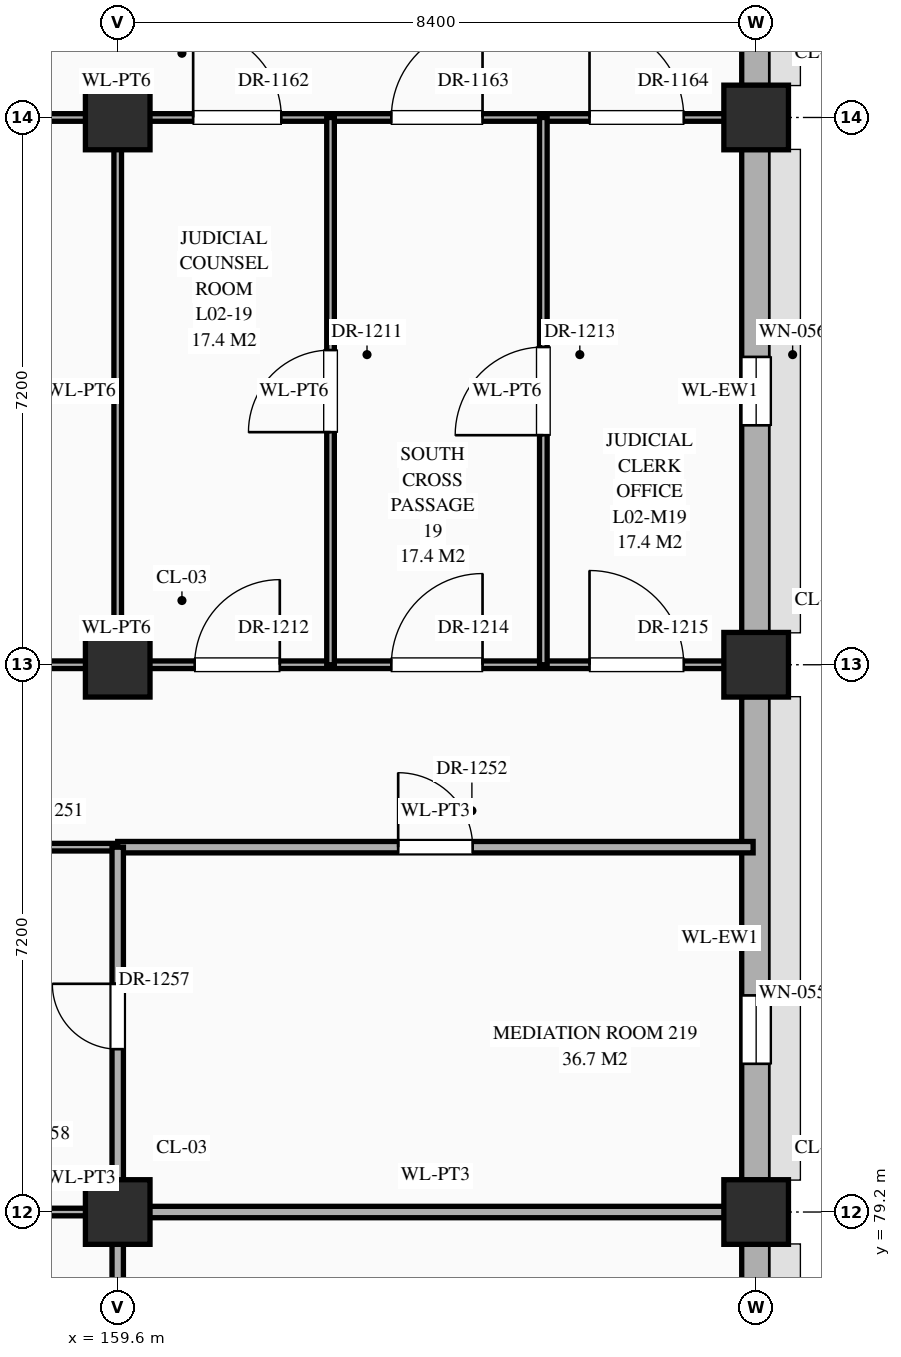
"""IFC4 building model, lengths in metres.
Left out: names, types, materials, properties, quantities, classifications, styles, units other than length and angle.
Written with IfcOpenShell. Run it as: python <this file> out.ifc"""

import sys

from ifc_helpers import new_model, si_unit, direction, frame, frame_2d, origin, origin_2d, place, context, subcontext, project, spatial, rectangle, extrude, element, fill, save


model = new_model("IFC4")
c1 = context("Model", 3, precision=1e-05, world=origin(), true_north=direction((0.0, 1.0)))
c2 = subcontext(c1, "Body", "Model", "MODEL_VIEW")
j1 = project(units=[si_unit("LENGTHUNIT", "METRE"), si_unit("PLANEANGLEUNIT", "RADIAN")], contexts=[c1])
p1 = place(None, origin())
s1 = spatial("IfcSite", under=j1, at=p1, CompositionType="ELEMENT")
p2 = place(p1, origin())
s2 = spatial("IfcBuilding", under=s1, at=p2, CompositionType="ELEMENT")
p3 = place(p2, frame((0.0, 0.0, 5.4)))
s3 = spatial("IfcBuildingStorey", under=s2, at=p3, CompositionType="ELEMENT", Elevation=5.4)
for number, where, z_axis, x_axis in (
    (1, (159.6, 79.2, 0.0), (0.0, 0.0, 1.0), (1.0, 0.0, 0.0)),
    (2, (159.6, 86.4, 0.0), (0.0, 0.0, 1.0), (1.0, 0.0, 0.0)),
    (3, (159.6, 93.6, 0.0), (0.0, 0.0, 1.0), (1.0, 0.0, 0.0)),
    (4, (168.0, 79.2, 0.0), (0.0, 0.0, 1.0), (1.0, 0.0, 0.0)),
    (5, (168.0, 86.4, 0.0), (0.0, 0.0, 1.0), (1.0, 0.0, 0.0)),
    (6, (168.0, 93.6, 0.0), (0.0, 0.0, 1.0), (1.0, 0.0, 0.0)),
):
    element("IfcColumn", number, at=place(p3, frame(where, z_axis=z_axis, x_axis=x_axis)), inside=s3, PredefinedType="COLUMN", context=c2, shape_type="SweptSolid", body=[
        extrude(rectangle(XDim=0.85, YDim=0.85, at=origin_2d()), origin(), (0.0, 0.0, 1.0), 5.4),
    ])
p4 = place(p3, frame((168.0, 72.42, 0.0), z_axis=(0.0, 0.0, 1.0), x_axis=(0.0, 1.0, 0.0)))
e7 = element("IfcWall", 7, at=p4, inside=s3, PredefinedType="STANDARD", context=c2, shape_type="SweptSolid", body=[
    extrude(rectangle(XDim=6.36, YDim=0.38, at=frame_2d((3.18, 0.0))), origin(), (0.0, 0.0, 1.0), 4.47),
])
p5 = place(p4, frame((2.13, 0.0, 0.85)))
e8 = element("IfcOpeningElement", 8, at=p5, cuts=e7, PredefinedType="OPENING", context=c2, shape_type="SweptSolid", body=[
    extrude(rectangle(XDim=2.1, YDim=1.92, at=frame_2d((1.05, 0.96))), frame((0.0, 0.202, 0.0), z_axis=(0.0, -1.0, 0.0), x_axis=(1.0, 0.0, 0.0)), (0.0, 0.0, 1.0), 0.404),
])
p6 = place(p3, frame((168.0, 79.62, 0.0), z_axis=(0.0, 0.0, 1.0), x_axis=(0.0, 1.0, 0.0)))
e9 = element("IfcWall", 9, at=p6, inside=s3, PredefinedType="STANDARD", context=c2, shape_type="SweptSolid", body=[
    extrude(rectangle(XDim=6.36, YDim=0.38, at=frame_2d((3.18, 0.0))), origin(), (0.0, 0.0, 1.0), 4.47),
])
p7 = place(p6, frame((1.53, 0.0, 0.85)))
e10 = element("IfcOpeningElement", 10, at=p7, cuts=e9, PredefinedType="OPENING", context=c2, shape_type="SweptSolid", body=[
    extrude(rectangle(XDim=0.9, YDim=2.12, at=frame_2d((0.45, 1.06))), frame((0.0, 0.202, 0.0), z_axis=(0.0, -1.0, 0.0), x_axis=(1.0, 0.0, 0.0)), (0.0, 0.0, 1.0), 0.404),
])
p8 = place(p3, frame((168.0, 86.82, 0.0), z_axis=(0.0, 0.0, 1.0), x_axis=(0.0, 1.0, 0.0)))
e11 = element("IfcWall", 11, at=p8, inside=s3, PredefinedType="STANDARD", context=c2, shape_type="SweptSolid", body=[
    extrude(rectangle(XDim=6.36, YDim=0.38, at=frame_2d((3.18, 0.0))), origin(), (0.0, 0.0, 1.0), 4.47),
])
p9 = place(p8, frame((2.73, 0.0, 0.85)))
e12 = element("IfcOpeningElement", 12, at=p9, cuts=e11, PredefinedType="OPENING", context=c2, shape_type="SweptSolid", body=[
    extrude(rectangle(XDim=0.9, YDim=1.2, at=frame_2d((0.45, 0.6))), frame((0.0, 0.202, 0.0), z_axis=(0.0, -1.0, 0.0), x_axis=(1.0, 0.0, 0.0)), (0.0, 0.0, 1.0), 0.404),
])
p10 = place(p3, frame((168.0, 94.02, 0.0), z_axis=(0.0, 0.0, 1.0), x_axis=(0.0, 1.0, 0.0)))
e13 = element("IfcWall", 13, at=p10, inside=s3, PredefinedType="STANDARD", context=c2, shape_type="SweptSolid", body=[
    extrude(rectangle(XDim=6.36, YDim=0.38, at=frame_2d((3.18, 0.0))), origin(), (0.0, 0.0, 1.0), 4.47),
])
p11 = place(p10, frame((3.88, 0.0, 0.85)))
e14 = element("IfcOpeningElement", 14, at=p11, cuts=e13, PredefinedType="OPENING", context=c2, shape_type="SweptSolid", body=[
    extrude(rectangle(XDim=1.2, YDim=1.38, at=frame_2d((0.6, 0.69))), frame((0.0, 0.202, 0.0), z_axis=(0.0, -1.0, 0.0), x_axis=(1.0, 0.0, 0.0)), (0.0, 0.0, 1.0), 0.404),
])
p12 = place(p3, frame((151.24, 79.2, 0.0), z_axis=(0.0, 0.0, 1.0), x_axis=(1.0, 0.0, 0.0)))
e15 = element("IfcWall", 15, at=p12, inside=s3, PredefinedType="STANDARD", context=c2, shape_type="SweptSolid", body=[
    extrude(rectangle(XDim=8.36, YDim=0.1, at=frame_2d((4.18, 0.0))), origin(), (0.0, 0.0, 1.0), 4.27),
])
p13 = place(p12, frame((6.327, 0.0, 0.0)))
e16 = element("IfcOpeningElement", 16, at=p13, cuts=e15, PredefinedType="OPENING", context=c2, shape_type="SweptSolid", body=[
    extrude(rectangle(XDim=0.92, YDim=2.15, at=frame_2d((0.46, 1.075))), frame((0.0, 0.062, 0.0), z_axis=(0.0, -1.0, 0.0), x_axis=(1.0, 0.0, 0.0)), (0.0, 0.0, 1.0), 0.124),
])
p14 = place(p3, frame((159.6, 79.2, 0.0), z_axis=(0.0, 0.0, 1.0), x_axis=(1.0, 0.0, 0.0)))
e17 = element("IfcWall", 17, at=p14, inside=s3, PredefinedType="STANDARD", context=c2, shape_type="SweptSolid", body=[
    extrude(rectangle(XDim=8.36, YDim=0.15, at=frame_2d((4.18, 0.0))), origin(), (0.0, 0.0, 1.0), 4.27),
])
p15 = place(p3, frame((151.2, 84.0, 0.0), z_axis=(0.0, 0.0, 1.0), x_axis=(1.0, 0.0, 0.0)))
e18 = element("IfcWall", 18, at=p15, inside=s3, PredefinedType="STANDARD", context=c2, shape_type="SweptSolid", body=[
    extrude(rectangle(XDim=8.4, YDim=0.1, at=frame_2d((4.2, 0.0))), origin(), (0.0, 0.0, 1.0), 5.12),
])
p16 = place(p15, frame((2.16, 0.0, 0.0)))
e19 = element("IfcOpeningElement", 19, at=p16, cuts=e18, PredefinedType="OPENING", context=c2, shape_type="SweptSolid", body=[
    extrude(rectangle(XDim=1.28, YDim=2.35, at=frame_2d((0.64, 1.175))), frame((0.0, 0.062, 0.0), z_axis=(0.0, -1.0, 0.0), x_axis=(1.0, 0.0, 0.0)), (0.0, 0.0, 1.0), 0.124),
])
p17 = place(p15, frame((6.53, 0.0, 0.0)))
e20 = element("IfcOpeningElement", 20, at=p17, cuts=e18, PredefinedType="OPENING", context=c2, shape_type="SweptSolid", body=[
    extrude(rectangle(XDim=0.94, YDim=2.3, at=frame_2d((0.47, 1.15))), frame((0.0, 0.062, 0.0), z_axis=(0.0, -1.0, 0.0), x_axis=(1.0, 0.0, 0.0)), (0.0, 0.0, 1.0), 0.124),
])
p18 = place(p3, frame((159.6, 84.0, 0.0), z_axis=(0.0, 0.0, 1.0), x_axis=(1.0, 0.0, 0.0)))
e21 = element("IfcWall", 21, at=p18, inside=s3, PredefinedType="STANDARD", context=c2, shape_type="SweptSolid", body=[
    extrude(rectangle(XDim=8.36, YDim=0.15, at=frame_2d((4.18, 0.0))), origin(), (0.0, 0.0, 1.0), 5.12),
])
p19 = place(p18, frame((3.69, 0.0, 0.0)))
e22 = element("IfcOpeningElement", 22, at=p19, cuts=e21, PredefinedType="OPENING", context=c2, shape_type="SweptSolid", body=[
    extrude(rectangle(XDim=0.98, YDim=2.35, at=frame_2d((0.49, 1.175))), frame((0.0, 0.087, 0.0), z_axis=(0.0, -1.0, 0.0), x_axis=(1.0, 0.0, 0.0)), (0.0, 0.0, 1.0), 0.174),
])
p20 = place(p3, frame((151.2, 86.4, 0.0), z_axis=(0.0, 0.0, 1.0), x_axis=(1.0, 0.0, 0.0)))
e23 = element("IfcWall", 23, at=p20, inside=s3, PredefinedType="STANDARD", context=c2, shape_type="SweptSolid", body=[
    extrude(rectangle(XDim=16.76, YDim=0.1, at=frame_2d((8.38, 0.0))), origin(), (0.0, 0.0, 1.0), 4.27),
])
p21 = place(p20, frame((3.68, 0.0, 0.0)))
e24 = element("IfcOpeningElement", 24, at=p21, cuts=e23, PredefinedType="OPENING", context=c2, shape_type="SweptSolid", body=[
    extrude(rectangle(XDim=1.04, YDim=2.2, at=frame_2d((0.52, 1.1))), frame((0.0, 0.062, 0.0), z_axis=(0.0, -1.0, 0.0), x_axis=(1.0, 0.0, 0.0)), (0.0, 0.0, 1.0), 0.124),
])
p22 = place(p20, frame((9.413, 0.0, 0.0)))
e25 = element("IfcOpeningElement", 25, at=p22, cuts=e23, PredefinedType="OPENING", context=c2, shape_type="SweptSolid", body=[
    extrude(rectangle(XDim=1.12, YDim=2.25, at=frame_2d((0.56, 1.125))), frame((0.0, 0.062, 0.0), z_axis=(0.0, -1.0, 0.0), x_axis=(1.0, 0.0, 0.0)), (0.0, 0.0, 1.0), 0.124),
])
p23 = place(p20, frame((12.0, 0.0, 0.0)))
e26 = element("IfcOpeningElement", 26, at=p23, cuts=e23, PredefinedType="OPENING", context=c2, shape_type="SweptSolid", body=[
    extrude(rectangle(XDim=1.2, YDim=2.35, at=frame_2d((0.6, 1.175))), frame((0.0, 0.062, 0.0), z_axis=(0.0, -1.0, 0.0), x_axis=(1.0, 0.0, 0.0)), (0.0, 0.0, 1.0), 0.124),
])
p24 = place(p20, frame((14.607, 0.0, 0.0)))
e27 = element("IfcOpeningElement", 27, at=p24, cuts=e23, PredefinedType="OPENING", context=c2, shape_type="SweptSolid", body=[
    extrude(rectangle(XDim=1.24, YDim=2.3, at=frame_2d((0.62, 1.15))), frame((0.0, 0.062, 0.0), z_axis=(0.0, -1.0, 0.0), x_axis=(1.0, 0.0, 0.0)), (0.0, 0.0, 1.0), 0.124),
])
p25 = place(p3, frame((151.2, 93.6, 0.0), z_axis=(0.0, 0.0, 1.0), x_axis=(1.0, 0.0, 0.0)))
e28 = element("IfcWall", 28, at=p25, inside=s3, PredefinedType="STANDARD", context=c2, shape_type="SweptSolid", body=[
    extrude(rectangle(XDim=16.76, YDim=0.1, at=frame_2d((8.38, 0.0))), origin(), (0.0, 0.0, 1.0), 4.27),
])
p26 = place(p25, frame((3.64, 0.0, 0.0)))
e29 = element("IfcOpeningElement", 29, at=p26, cuts=e28, PredefinedType="OPENING", context=c2, shape_type="SweptSolid", body=[
    extrude(rectangle(XDim=1.12, YDim=2.25, at=frame_2d((0.56, 1.125))), frame((0.0, 0.062, 0.0), z_axis=(0.0, -1.0, 0.0), x_axis=(1.0, 0.0, 0.0)), (0.0, 0.0, 1.0), 0.124),
])
p27 = place(p25, frame((9.393, 0.0, 0.0)))
e30 = element("IfcOpeningElement", 30, at=p27, cuts=e28, PredefinedType="OPENING", context=c2, shape_type="SweptSolid", body=[
    extrude(rectangle(XDim=1.16, YDim=2.3, at=frame_2d((0.58, 1.15))), frame((0.0, 0.062, 0.0), z_axis=(0.0, -1.0, 0.0), x_axis=(1.0, 0.0, 0.0)), (0.0, 0.0, 1.0), 0.124),
])
p28 = place(p25, frame((12.0, 0.0, 0.0)))
e31 = element("IfcOpeningElement", 31, at=p28, cuts=e28, PredefinedType="OPENING", context=c2, shape_type="SweptSolid", body=[
    extrude(rectangle(XDim=1.2, YDim=2.35, at=frame_2d((0.6, 1.175))), frame((0.0, 0.062, 0.0), z_axis=(0.0, -1.0, 0.0), x_axis=(1.0, 0.0, 0.0)), (0.0, 0.0, 1.0), 0.124),
])
p29 = place(p25, frame((14.607, 0.0, 0.0)))
e32 = element("IfcOpeningElement", 32, at=p29, cuts=e28, PredefinedType="OPENING", context=c2, shape_type="SweptSolid", body=[
    extrude(rectangle(XDim=1.24, YDim=2.3, at=frame_2d((0.62, 1.15))), frame((0.0, 0.062, 0.0), z_axis=(0.0, -1.0, 0.0), x_axis=(1.0, 0.0, 0.0)), (0.0, 0.0, 1.0), 0.124),
])
p30 = place(p3, frame((159.6, 50.4, 0.0), z_axis=(0.0, 0.0, 1.0), x_axis=(0.0, 1.0, 0.0)))
e33 = element("IfcWall", 33, at=p30, inside=s3, PredefinedType="STANDARD", context=c2, shape_type="SweptSolid", body=[
    extrude(rectangle(XDim=33.6, YDim=0.15, at=frame_2d((16.8, 0.0))), origin(), (0.0, 0.0, 1.0), 4.37),
])
p31 = place(p30, frame((30.942, 0.0, 0.0)))
e34 = element("IfcOpeningElement", 34, at=p31, cuts=e33, PredefinedType="OPENING", context=c2, shape_type="SweptSolid", body=[
    extrude(rectangle(XDim=0.86, YDim=2.1, at=frame_2d((0.43, 1.05))), frame((0.0, 0.087, 0.0), z_axis=(0.0, -1.0, 0.0), x_axis=(1.0, 0.0, 0.0)), (0.0, 0.0, 1.0), 0.174),
])
p32 = place(p30, frame((3.03, 0.0, 0.0)))
e35 = element("IfcOpeningElement", 35, at=p32, cuts=e33, PredefinedType="OPENING", context=c2, shape_type="SweptSolid", body=[
    extrude(rectangle(XDim=1.14, YDim=2.4, at=frame_2d((0.57, 1.2))), frame((0.0, 0.087, 0.0), z_axis=(0.0, -1.0, 0.0), x_axis=(1.0, 0.0, 0.0)), (0.0, 0.0, 1.0), 0.174),
])
p33 = place(p30, frame((10.35, 0.0, 0.0)))
e36 = element("IfcOpeningElement", 36, at=p33, cuts=e33, PredefinedType="OPENING", context=c2, shape_type="SweptSolid", body=[
    extrude(rectangle(XDim=0.9, YDim=2.15, at=frame_2d((0.45, 1.075))), frame((0.0, 0.087, 0.0), z_axis=(0.0, -1.0, 0.0), x_axis=(1.0, 0.0, 0.0)), (0.0, 0.0, 1.0), 0.174),
])
p34 = place(p30, frame((17.57, 0.0, 0.0)))
e37 = element("IfcOpeningElement", 37, at=p34, cuts=e33, PredefinedType="OPENING", context=c2, shape_type="SweptSolid", body=[
    extrude(rectangle(XDim=0.86, YDim=2.1, at=frame_2d((0.43, 1.05))), frame((0.0, 0.087, 0.0), z_axis=(0.0, -1.0, 0.0), x_axis=(1.0, 0.0, 0.0)), (0.0, 0.0, 1.0), 0.174),
])
p35 = place(p30, frame((24.74, 0.0, 0.0)))
e38 = element("IfcOpeningElement", 38, at=p35, cuts=e33, PredefinedType="OPENING", context=c2, shape_type="SweptSolid", body=[
    extrude(rectangle(XDim=0.92, YDim=2.15, at=frame_2d((0.46, 1.075))), frame((0.0, 0.087, 0.0), z_axis=(0.0, -1.0, 0.0), x_axis=(1.0, 0.0, 0.0)), (0.0, 0.0, 1.0), 0.174),
])
p36 = place(p3, frame((159.6, 86.4, 0.0), z_axis=(0.0, 0.0, 1.0), x_axis=(0.0, 1.0, 0.0)))
e39 = element("IfcWall", 39, at=p36, inside=s3, PredefinedType="STANDARD", context=c2, shape_type="SweptSolid", body=[
    extrude(rectangle(XDim=7.2, YDim=0.1, at=frame_2d((3.6, 0.0))), origin(), (0.0, 0.0, 1.0), 4.37),
])
p37 = place(p3, frame((162.4, 86.4, 0.0), z_axis=(0.0, 0.0, 1.0), x_axis=(0.0, 1.0, 0.0)))
e40 = element("IfcWall", 40, at=p37, inside=s3, PredefinedType="STANDARD", context=c2, shape_type="SweptSolid", body=[
    extrude(rectangle(XDim=7.2, YDim=0.1, at=frame_2d((3.6, 0.0))), origin(), (0.0, 0.0, 1.0), 5.12),
])
p38 = place(p37, frame((3.06, 0.0, 0.0)))
e41 = element("IfcOpeningElement", 41, at=p38, cuts=e40, PredefinedType="OPENING", context=c2, shape_type="SweptSolid", body=[
    extrude(rectangle(XDim=1.08, YDim=2.25, at=frame_2d((0.54, 1.125))), frame((0.0, 0.062, 0.0), z_axis=(0.0, -1.0, 0.0), x_axis=(1.0, 0.0, 0.0)), (0.0, 0.0, 1.0), 0.124),
])
p39 = place(p3, frame((165.2, 86.4, 0.0), z_axis=(0.0, 0.0, 1.0), x_axis=(0.0, 1.0, 0.0)))
e42 = element("IfcWall", 42, at=p39, inside=s3, PredefinedType="STANDARD", context=c2, shape_type="SweptSolid", body=[
    extrude(rectangle(XDim=7.2, YDim=0.1, at=frame_2d((3.6, 0.0))), origin(), (0.0, 0.0, 1.0), 5.12),
])
p40 = place(p39, frame((3.02, 0.0, 0.0)))
e43 = element("IfcOpeningElement", 43, at=p40, cuts=e42, PredefinedType="OPENING", context=c2, shape_type="SweptSolid", body=[
    extrude(rectangle(XDim=1.16, YDim=2.3, at=frame_2d((0.58, 1.15))), frame((0.0, 0.062, 0.0), z_axis=(0.0, -1.0, 0.0), x_axis=(1.0, 0.0, 0.0)), (0.0, 0.0, 1.0), 0.124),
])
p41 = place(p7, origin())
e44 = element("IfcWindow", 44, at=p41, inside=s3, PartitioningType="SINGLE_PANEL", PredefinedType="WINDOW", context=c2, shape_type="SweptSolid", body=[
    extrude(rectangle(XDim=0.9, YDim=2.12, at=frame_2d((0.45, 1.06))), frame((0.0, 0.03, 0.0), z_axis=(0.0, -1.0, 0.0), x_axis=(1.0, 0.0, 0.0)), (0.0, 0.0, 1.0), 0.06),
])
fill(e10, e44)
p42 = place(p9, origin())
e45 = element("IfcWindow", 45, at=p42, inside=s3, PartitioningType="SINGLE_PANEL", PredefinedType="WINDOW", context=c2, shape_type="SweptSolid", body=[
    extrude(rectangle(XDim=0.9, YDim=1.2, at=frame_2d((0.45, 0.6))), frame((0.0, 0.03, 0.0), z_axis=(0.0, -1.0, 0.0), x_axis=(1.0, 0.0, 0.0)), (0.0, 0.0, 1.0), 0.06),
])
fill(e12, e45)
p43 = place(p27, origin())
e46 = element("IfcDoor", 46, at=p43, inside=s3, OperationType="SINGLE_SWING_LEFT", PredefinedType="DOOR", context=c2, shape_type="SweptSolid", body=[
    extrude(rectangle(XDim=1.16, YDim=2.3, at=frame_2d((0.58, 1.15))), frame((0.0, 0.025, 0.0), z_axis=(0.0, -1.0, 0.0), x_axis=(1.0, 0.0, 0.0)), (0.0, 0.0, 1.0), 0.05),
])
fill(e30, e46)
p44 = place(p28, origin())
e47 = element("IfcDoor", 47, at=p44, inside=s3, OperationType="SINGLE_SWING_RIGHT", PredefinedType="DOOR", context=c2, shape_type="SweptSolid", body=[
    extrude(rectangle(XDim=1.2, YDim=2.35, at=frame_2d((0.6, 1.175))), frame((0.0, 0.025, 0.0), z_axis=(0.0, -1.0, 0.0), x_axis=(1.0, 0.0, 0.0)), (0.0, 0.0, 1.0), 0.05),
])
fill(e31, e47)
p45 = place(p29, origin())
e48 = element("IfcDoor", 48, at=p45, inside=s3, OperationType="SINGLE_SWING_LEFT", PredefinedType="DOOR", context=c2, shape_type="SweptSolid", body=[
    extrude(rectangle(XDim=1.24, YDim=2.3, at=frame_2d((0.62, 1.15))), frame((0.0, 0.025, 0.0), z_axis=(0.0, -1.0, 0.0), x_axis=(1.0, 0.0, 0.0)), (0.0, 0.0, 1.0), 0.05),
])
fill(e32, e48)
p46 = place(p38, origin())
e49 = element("IfcDoor", 49, at=p46, inside=s3, OperationType="SINGLE_SWING_LEFT", PredefinedType="DOOR", context=c2, shape_type="SweptSolid", body=[
    extrude(rectangle(XDim=1.08, YDim=2.25, at=frame_2d((0.54, 1.125))), frame((0.0, 0.025, 0.0), z_axis=(0.0, -1.0, 0.0), x_axis=(1.0, 0.0, 0.0)), (0.0, 0.0, 1.0), 0.05),
])
fill(e41, e49)
p47 = place(p22, origin())
e50 = element("IfcDoor", 50, at=p47, inside=s3, OperationType="SINGLE_SWING_RIGHT", PredefinedType="DOOR", context=c2, shape_type="SweptSolid", body=[
    extrude(rectangle(XDim=1.12, YDim=2.25, at=frame_2d((0.56, 1.125))), frame((0.0, 0.025, 0.0), z_axis=(0.0, -1.0, 0.0), x_axis=(1.0, 0.0, 0.0)), (0.0, 0.0, 1.0), 0.05),
])
fill(e25, e50)
p48 = place(p40, origin())
e51 = element("IfcDoor", 51, at=p48, inside=s3, OperationType="SINGLE_SWING_LEFT", PredefinedType="DOOR", context=c2, shape_type="SweptSolid", body=[
    extrude(rectangle(XDim=1.16, YDim=2.3, at=frame_2d((0.58, 1.15))), frame((0.0, 0.025, 0.0), z_axis=(0.0, -1.0, 0.0), x_axis=(1.0, 0.0, 0.0)), (0.0, 0.0, 1.0), 0.05),
])
fill(e43, e51)
p49 = place(p23, origin())
e52 = element("IfcDoor", 52, at=p49, inside=s3, OperationType="SINGLE_SWING_RIGHT", PredefinedType="DOOR", context=c2, shape_type="SweptSolid", body=[
    extrude(rectangle(XDim=1.2, YDim=2.35, at=frame_2d((0.6, 1.175))), frame((0.0, 0.025, 0.0), z_axis=(0.0, -1.0, 0.0), x_axis=(1.0, 0.0, 0.0)), (0.0, 0.0, 1.0), 0.05),
])
fill(e26, e52)
p50 = place(p24, origin())
e53 = element("IfcDoor", 53, at=p50, inside=s3, OperationType="SINGLE_SWING_LEFT", PredefinedType="DOOR", context=c2, shape_type="SweptSolid", body=[
    extrude(rectangle(XDim=1.24, YDim=2.3, at=frame_2d((0.62, 1.15))), frame((0.0, 0.025, 0.0), z_axis=(0.0, -1.0, 0.0), x_axis=(1.0, 0.0, 0.0)), (0.0, 0.0, 1.0), 0.05),
])
fill(e27, e53)
p51 = place(p19, origin())
e54 = element("IfcDoor", 54, at=p51, inside=s3, OperationType="SINGLE_SWING_LEFT", PredefinedType="DOOR", context=c2, shape_type="SweptSolid", body=[
    extrude(rectangle(XDim=0.98, YDim=2.35, at=frame_2d((0.49, 1.175))), frame((0.0, 0.025, 0.0), z_axis=(0.0, -1.0, 0.0), x_axis=(1.0, 0.0, 0.0)), (0.0, 0.0, 1.0), 0.05),
])
fill(e22, e54)
p52 = place(p31, origin())
e55 = element("IfcDoor", 55, at=p52, inside=s3, OperationType="SINGLE_SWING_RIGHT", PredefinedType="DOOR", context=c2, shape_type="SweptSolid", body=[
    extrude(rectangle(XDim=0.86, YDim=2.1, at=frame_2d((0.43, 1.05))), frame((0.0, 0.025, 0.0), z_axis=(0.0, -1.0, 0.0), x_axis=(1.0, 0.0, 0.0)), (0.0, 0.0, 1.0), 0.05),
])
fill(e34, e55)
save(model, sys.argv[1])
